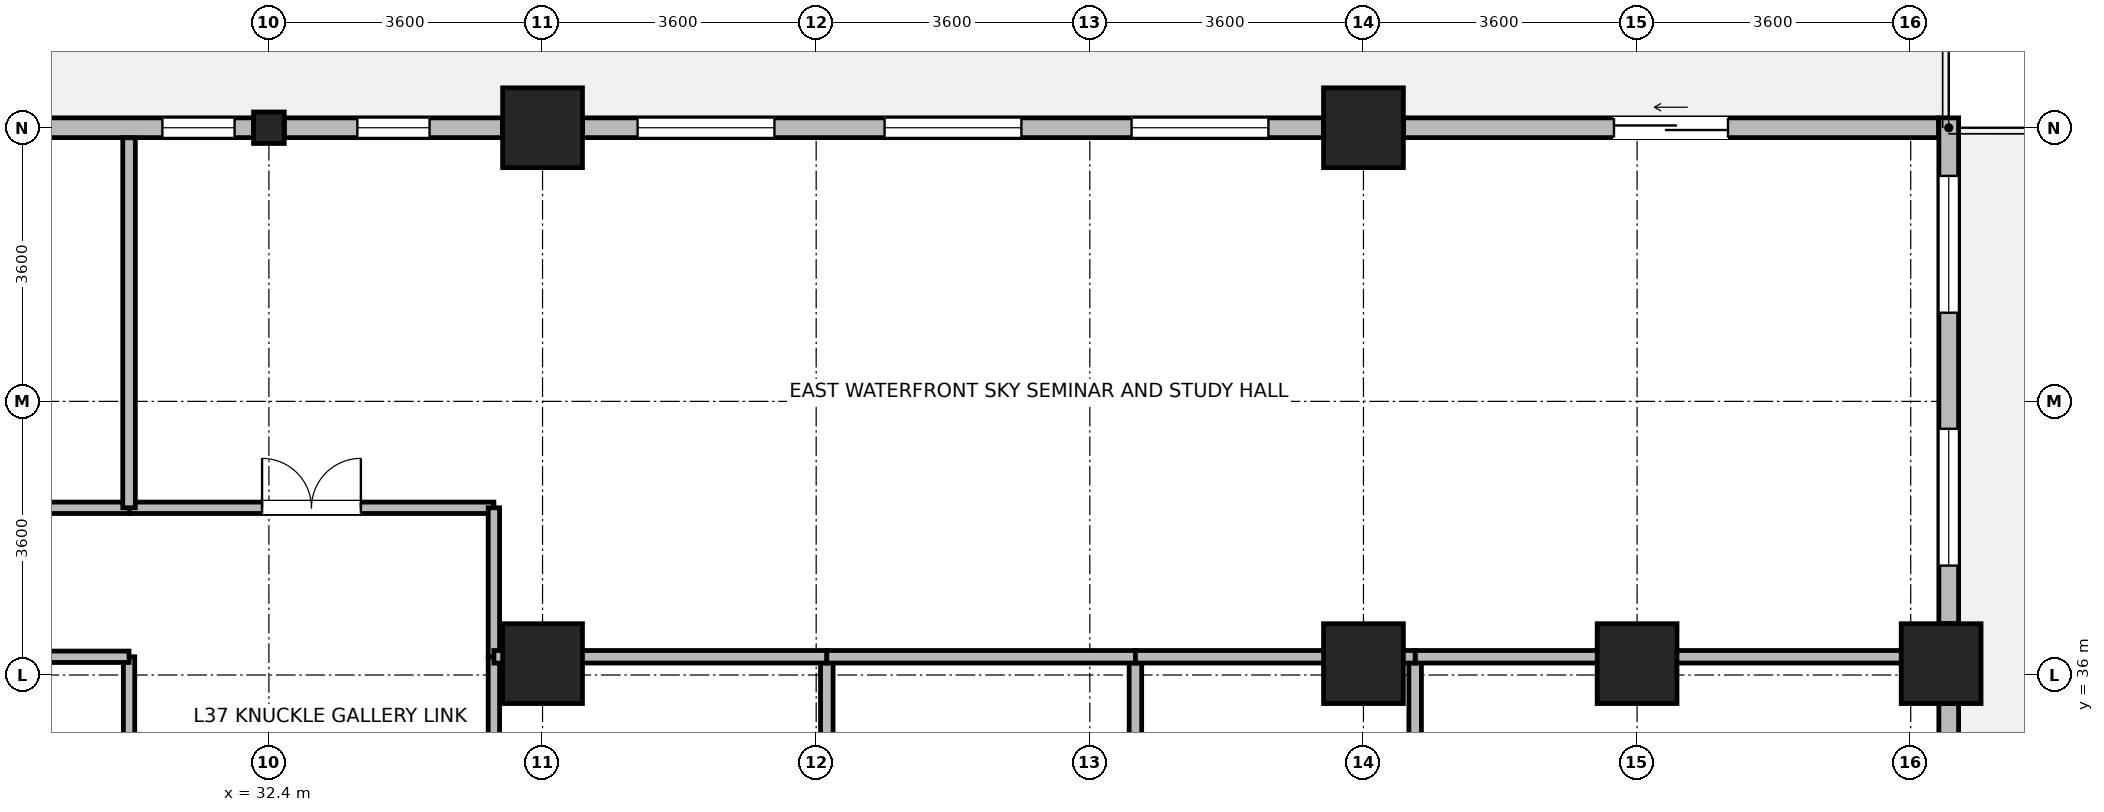
"""IFC4 building model, lengths in metres.
Left out: names, types, materials, properties, quantities, classifications, styles, units other than length and angle.
Written with IfcOpenShell. Run it as: python <this file> out.ifc"""

import sys

from ifc_helpers import new_model, si_unit, direction, frame, frame_2d, origin, origin_2d, place, context, subcontext, project, spatial, rectangle, i_section, extrude, source, transform, mapped, element, fill, save


model = new_model("IFC4")
c1 = context("Model", 3, precision=1e-05, world=origin(), true_north=direction((0.0, 1.0)))
c2 = subcontext(c1, "Body", "Model", "MODEL_VIEW")
j1 = project(units=[si_unit("LENGTHUNIT", "METRE"), si_unit("PLANEANGLEUNIT", "RADIAN")], contexts=[c1])
p1 = place(None, origin())
s1 = spatial("IfcSite", under=j1, at=p1, CompositionType="ELEMENT")
p2 = place(p1, origin())
s2 = spatial("IfcBuilding", under=s1, at=p2, CompositionType="ELEMENT")
p3 = place(p2, frame((0.0, 0.0, 147.6)))
s3 = spatial("IfcBuildingStorey", under=s2, at=p3, CompositionType="ELEMENT", Elevation=147.6)
m1 = source(origin(), c2, "Body", "SweptSolid", [
    extrude(rectangle(XDim=1.05, YDim=1.05, at=origin_2d()), origin(), (0.0, 0.0, 1.0), 3.7),
])
for number, where, z_axis, x_axis in (
    (1, (36.0, 43.2, 0.0), (0.0, 0.0, 1.0), (1.0, 0.0, 0.0)),
    (2, (36.0, 36.15, 0.0), (0.0, 0.0, 1.0), (1.0, 0.0, 0.0)),
    (3, (46.8, 36.15, 0.0), (0.0, 0.0, 1.0), (1.0, 0.0, 0.0)),
    (4, (46.8, 43.2, 0.0), (0.0, 0.0, 1.0), (1.0, 0.0, 0.0)),
    (5, (50.4, 36.15, 0.0), (0.0, 0.0, 1.0), (1.0, 0.0, 0.0)),
    (6, (54.4, 36.15, 0.0), (0.0, 0.0, 1.0), (1.0, 0.0, 0.0)),
):
    element("IfcColumn", number, at=place(p3, frame(where, z_axis=z_axis, x_axis=x_axis)), inside=s3, PredefinedType="COLUMN", context=c2, shape_type="MappedRepresentation", body=[
        mapped(m1, transform((0.0, 0.0, 0.0), x_axis=(1.0, 0.0, 0.0), y_axis=(0.0, 1.0, 0.0), z_axis=(0.0, 0.0, 1.0), scale=1.0)),
    ])
m2 = source(origin(), c2, "Body", "SweptSolid", [
    extrude(i_section(OverallWidth=0.404, OverallDepth=0.414, WebThickness=0.021, FlangeThickness=0.028, FilletRadius=0.015, at=origin_2d()), origin(), (0.0, 0.0, 1.0), 3.7),
])
p4 = place(p3, frame((32.4, 43.2, 0.0), z_axis=(0.0, 0.0, 1.0), x_axis=(1.0, 0.0, 0.0)))
e7 = element("IfcColumn", 7, at=p4, inside=s3, PredefinedType="COLUMN", context=c2, shape_type="MappedRepresentation", body=[
    mapped(m2, transform((0.0, 0.0, 0.0), x_axis=(1.0, 0.0, 0.0), y_axis=(0.0, 1.0, 0.0), z_axis=(0.0, 0.0, 1.0), scale=1.0)),
])
p5 = place(p3, frame((54.5, 35.624, 0.0), z_axis=(0.0, 0.0, 1.0), x_axis=(0.0, -1.0, 0.0)))
e8 = element("IfcWall", 8, at=p5, inside=s3, PredefinedType="STANDARD", context=c2, shape_type="SweptSolid", body=[
    extrude(rectangle(XDim=6.448, YDim=0.26, at=frame_2d((3.224, 0.0))), origin(), (0.0, 0.0, 1.0), 2.99),
])
p6 = place(p5, frame((0.712, 0.0, 0.85)))
e9 = element("IfcOpeningElement", 9, at=p6, cuts=e8, PredefinedType="OPENING", context=c2, shape_type="SweptSolid", body=[
    extrude(rectangle(XDim=1.8, YDim=1.85, at=frame_2d((0.9, 0.925))), frame((0.0, 0.14, 0.0), z_axis=(0.0, -1.0, 0.0), x_axis=(1.0, 0.0, 0.0)), (0.0, 0.0, 1.0), 0.28),
])
p7 = place(p5, frame((3.936, 0.0, 0.85)))
e10 = element("IfcOpeningElement", 10, at=p7, cuts=e8, PredefinedType="OPENING", context=c2, shape_type="SweptSolid", body=[
    extrude(rectangle(XDim=1.8, YDim=1.85, at=frame_2d((0.9, 0.925))), frame((0.0, 0.14, 0.0), z_axis=(0.0, -1.0, 0.0), x_axis=(1.0, 0.0, 0.0)), (0.0, 0.0, 1.0), 0.28),
])
p8 = place(p3, frame((54.5, 43.33, 0.0), z_axis=(0.0, 0.0, 1.0), x_axis=(0.0, -1.0, 0.0)))
e11 = element("IfcWall", 11, at=p8, inside=s3, PredefinedType="STANDARD", context=c2, shape_type="SweptSolid", body=[
    extrude(rectangle(XDim=6.654, YDim=0.26, at=frame_2d((3.327, 0.0))), origin(), (0.0, 0.0, 1.0), 3.44),
])
p9 = place(p8, frame((0.763, 0.0, 0.85)))
e12 = element("IfcOpeningElement", 12, at=p9, cuts=e11, PredefinedType="OPENING", context=c2, shape_type="SweptSolid", body=[
    extrude(rectangle(XDim=1.8, YDim=1.85, at=frame_2d((0.9, 0.925))), frame((0.0, 0.14, 0.0), z_axis=(0.0, -1.0, 0.0), x_axis=(1.0, 0.0, 0.0)), (0.0, 0.0, 1.0), 0.28),
])
p10 = place(p8, frame((4.091, 0.0, 0.85)))
e13 = element("IfcOpeningElement", 13, at=p10, cuts=e11, PredefinedType="OPENING", context=c2, shape_type="SweptSolid", body=[
    extrude(rectangle(XDim=1.8, YDim=1.85, at=frame_2d((0.9, 0.925))), frame((0.0, 0.14, 0.0), z_axis=(0.0, -1.0, 0.0), x_axis=(1.0, 0.0, 0.0)), (0.0, 0.0, 1.0), 0.28),
])
p11 = place(p3, frame((47.326, 43.2, 0.0), z_axis=(0.0, 0.0, 1.0), x_axis=(1.0, 0.0, 0.0)))
e14 = element("IfcWall", 14, at=p11, inside=s3, PredefinedType="STANDARD", context=c2, shape_type="SweptSolid", body=[
    extrude(rectangle(XDim=7.039, YDim=0.26, at=frame_2d((3.52, 0.0))), origin(), (0.0, 0.0, 1.0), 3.44),
])
p12 = place(p11, frame((2.77, 0.0, 0.0)))
e15 = element("IfcOpeningElement", 15, at=p12, cuts=e14, PredefinedType="OPENING", context=c2, shape_type="SweptSolid", body=[
    extrude(rectangle(XDim=1.5, YDim=2.15, at=frame_2d((0.75, 1.075))), frame((0.0, 0.14, 0.0), z_axis=(0.0, -1.0, 0.0), x_axis=(1.0, 0.0, 0.0)), (0.0, 0.0, 1.0), 0.28),
])
p13 = place(p3, frame((36.526, 43.2, 0.0), z_axis=(0.0, 0.0, 1.0), x_axis=(1.0, 0.0, 0.0)))
e16 = element("IfcWall", 16, at=p13, inside=s3, PredefinedType="STANDARD", context=c2, shape_type="SweptSolid", body=[
    extrude(rectangle(XDim=9.748, YDim=0.26, at=frame_2d((4.874, 0.0))), origin(), (0.0, 0.0, 1.0), 2.99),
])
p14 = place(p13, frame((0.725, 0.0, 0.85)))
e17 = element("IfcOpeningElement", 17, at=p14, cuts=e16, PredefinedType="OPENING", context=c2, shape_type="SweptSolid", body=[
    extrude(rectangle(XDim=1.8, YDim=1.85, at=frame_2d((0.9, 0.925))), frame((0.0, 0.14, 0.0), z_axis=(0.0, -1.0, 0.0), x_axis=(1.0, 0.0, 0.0)), (0.0, 0.0, 1.0), 0.28),
])
p15 = place(p13, frame((3.974, 0.0, 0.85)))
e18 = element("IfcOpeningElement", 18, at=p15, cuts=e16, PredefinedType="OPENING", context=c2, shape_type="SweptSolid", body=[
    extrude(rectangle(XDim=1.8, YDim=1.85, at=frame_2d((0.9, 0.925))), frame((0.0, 0.14, 0.0), z_axis=(0.0, -1.0, 0.0), x_axis=(1.0, 0.0, 0.0)), (0.0, 0.0, 1.0), 0.28),
])
p16 = place(p13, frame((7.223, 0.0, 0.85)))
e19 = element("IfcOpeningElement", 19, at=p16, cuts=e16, PredefinedType="OPENING", context=c2, shape_type="SweptSolid", body=[
    extrude(rectangle(XDim=1.8, YDim=1.85, at=frame_2d((0.9, 0.925))), frame((0.0, 0.14, 0.0), z_axis=(0.0, -1.0, 0.0), x_axis=(1.0, 0.0, 0.0)), (0.0, 0.0, 1.0), 0.28),
])
p17 = place(p3, frame((32.603, 43.2, 0.0), z_axis=(0.0, 0.0, 1.0), x_axis=(1.0, 0.0, 0.0)))
e20 = element("IfcWall", 20, at=p17, inside=s3, PredefinedType="STANDARD", context=c2, shape_type="SweptSolid", body=[
    extrude(rectangle(XDim=2.871, YDim=0.26, at=frame_2d((1.436, 0.0))), origin(), (0.0, 0.0, 1.0), 2.99),
])
p18 = place(p17, frame((0.96, 0.0, 0.85)))
e21 = element("IfcOpeningElement", 21, at=p18, cuts=e20, PredefinedType="OPENING", context=c2, shape_type="SweptSolid", body=[
    extrude(rectangle(XDim=0.95, YDim=1.75, at=frame_2d((0.475, 0.875))), frame((0.0, 0.14, 0.0), z_axis=(0.0, -1.0, 0.0), x_axis=(1.0, 0.0, 0.0)), (0.0, 0.0, 1.0), 0.28),
])
p19 = place(p3, frame((29.326, 43.2, 0.0), z_axis=(0.0, 0.0, 1.0), x_axis=(1.0, 0.0, 0.0)))
e22 = element("IfcWall", 22, at=p19, inside=s3, PredefinedType="STANDARD", context=c2, shape_type="SweptSolid", body=[
    extrude(rectangle(XDim=2.871, YDim=0.26, at=frame_2d((1.436, 0.0))), origin(), (0.0, 0.0, 1.0), 2.99),
])
p20 = place(p19, frame((1.673, 0.0, 0.85)))
e23 = element("IfcOpeningElement", 23, at=p20, cuts=e22, PredefinedType="OPENING", context=c2, shape_type="SweptSolid", body=[
    extrude(rectangle(XDim=0.95, YDim=1.75, at=frame_2d((0.475, 0.875))), frame((0.0, 0.14, 0.0), z_axis=(0.0, -1.0, 0.0), x_axis=(1.0, 0.0, 0.0)), (0.0, 0.0, 1.0), 0.28),
])
p21 = place(p3, frame((35.36, 28.56, 0.0), z_axis=(0.0, 0.0, 1.0), x_axis=(0.0, 1.0, 0.0)))
e24 = element("IfcWall", 24, at=p21, inside=s3, PredefinedType="PARTITIONING", context=c2, shape_type="SweptSolid", body=[
    extrude(rectangle(XDim=7.68, YDim=0.15, at=frame_2d((3.84, 0.0))), origin(), (0.0, 0.0, 1.0), 3.44),
])
p22 = place(p21, frame((3.19, 0.0, 0.0)))
e25 = element("IfcOpeningElement", 25, at=p22, cuts=e24, PredefinedType="OPENING", context=c2, shape_type="SweptSolid", body=[
    extrude(rectangle(XDim=1.3, YDim=2.12, at=frame_2d((0.65, 1.06))), frame((0.0, 0.085, 0.0), z_axis=(0.0, -1.0, 0.0), x_axis=(1.0, 0.0, 0.0)), (0.0, 0.0, 1.0), 0.17),
])
p23 = place(p3, frame((23.48, 38.2, 0.0), z_axis=(0.0, 0.0, 1.0), x_axis=(1.0, 0.0, 0.0)))
e26 = element("IfcWall", 26, at=p23, inside=s3, PredefinedType="PARTITIONING", context=c2, shape_type="SweptSolid", body=[
    extrude(rectangle(XDim=7.08, YDim=0.15, at=frame_2d((3.54, 0.0))), origin(), (0.0, 0.0, 1.0), 3.44),
])
p24 = place(p23, frame((2.89, 0.0, 0.0)))
e27 = element("IfcOpeningElement", 27, at=p24, cuts=e26, PredefinedType="OPENING", context=c2, shape_type="SweptSolid", body=[
    extrude(rectangle(XDim=1.3, YDim=2.12, at=frame_2d((0.65, 1.06))), frame((0.0, 0.085, 0.0), z_axis=(0.0, -1.0, 0.0), x_axis=(1.0, 0.0, 0.0)), (0.0, 0.0, 1.0), 0.17),
])
p25 = place(p3, frame((30.56, 38.2, 0.0), z_axis=(0.0, 0.0, 1.0), x_axis=(1.0, 0.0, 0.0)))
e28 = element("IfcWall", 28, at=p25, inside=s3, PredefinedType="PARTITIONING", context=c2, shape_type="SweptSolid", body=[
    extrude(rectangle(XDim=4.8, YDim=0.15, at=frame_2d((2.4, 0.0))), origin(), (0.0, 0.0, 1.0), 3.44),
])
p26 = place(p25, frame((1.75, 0.0, 0.0)))
e29 = element("IfcOpeningElement", 29, at=p26, cuts=e28, PredefinedType="OPENING", context=c2, shape_type="SweptSolid", body=[
    extrude(rectangle(XDim=1.3, YDim=2.12, at=frame_2d((0.65, 1.06))), frame((0.0, 0.085, 0.0), z_axis=(0.0, -1.0, 0.0), x_axis=(1.0, 0.0, 0.0)), (0.0, 0.0, 1.0), 0.17),
])
p27 = place(p3, frame((30.56, 32.4, 0.0), z_axis=(0.0, 0.0, 1.0), x_axis=(0.0, 1.0, 0.0)))
e30 = element("IfcWall", 30, at=p27, inside=s3, PredefinedType="PARTITIONING", context=c2, shape_type="SweptSolid", body=[
    extrude(rectangle(XDim=3.84, YDim=0.15, at=frame_2d((1.92, 0.0))), origin(), (0.0, 0.0, 1.0), 3.44),
])
p28 = place(p27, frame((1.27, 0.0, 0.0)))
e31 = element("IfcOpeningElement", 31, at=p28, cuts=e30, PredefinedType="OPENING", context=c2, shape_type="SweptSolid", body=[
    extrude(rectangle(XDim=1.3, YDim=2.12, at=frame_2d((0.65, 1.06))), frame((0.0, 0.085, 0.0), z_axis=(0.0, -1.0, 0.0), x_axis=(1.0, 0.0, 0.0)), (0.0, 0.0, 1.0), 0.17),
])
p29 = place(p3, frame((35.36, 36.24, 0.0), z_axis=(0.0, 0.0, 1.0), x_axis=(0.0, 1.0, 0.0)))
e32 = element("IfcWall", 32, at=p29, inside=s3, PredefinedType="PARTITIONING", context=c2, shape_type="SweptSolid", body=[
    extrude(rectangle(XDim=1.96, YDim=0.15, at=frame_2d((0.98, 0.0))), origin(), (0.0, 0.0, 1.0), 3.44),
])
p30 = place(p3, frame((29.325, 36.24, 0.0), z_axis=(0.0, 0.0, 1.0), x_axis=(1.0, 0.0, 0.0)))
e33 = element("IfcWall", 33, at=p30, inside=s3, PredefinedType="PARTITIONING", context=c2, shape_type="SweptSolid", body=[
    extrude(rectangle(XDim=1.235, YDim=0.15, at=frame_2d((0.618, 0.0))), origin(), (0.0, 0.0, 1.0), 2.84),
])
for number, where, z_axis, x_axis in (
    (34, (39.74, 28.56, 0.0), (0.0, 0.0, 1.0), (0.0, 1.0, 0.0)),
    (35, (43.8, 28.56, 0.0), (0.0, 0.0, 1.0), (0.0, 1.0, 0.0)),
    (36, (47.48, 28.56, 0.0), (0.0, 0.0, 1.0), (0.0, 1.0, 0.0)),
):
    element("IfcWall", number, at=place(p3, frame(where, z_axis=z_axis, x_axis=x_axis)), inside=s3, PredefinedType="PARTITIONING", context=c2, shape_type="SweptSolid", body=[
        extrude(rectangle(XDim=7.68, YDim=0.165, at=frame_2d((3.84, 0.0))), origin(), (0.0, 0.0, 1.0), 3.44),
    ])
p31 = place(p3, frame((47.48, 36.24, 0.0), z_axis=(0.0, 0.0, 1.0), x_axis=(1.0, 0.0, 0.0)))
e37 = element("IfcWall", 37, at=p31, inside=s3, PredefinedType="PARTITIONING", context=c2, shape_type="SweptSolid", body=[
    extrude(rectangle(XDim=6.888, YDim=0.165, at=frame_2d((3.444, 0.0))), origin(), (0.0, 0.0, 1.0), 2.84),
])
p32 = place(p3, frame((30.56, 38.2, 0.0), z_axis=(0.0, 0.0, 1.0), x_axis=(0.0, 1.0, 0.0)))
e38 = element("IfcWall", 38, at=p32, inside=s3, PredefinedType="PARTITIONING", context=c2, shape_type="SweptSolid", body=[
    extrude(rectangle(XDim=4.868, YDim=0.165, at=frame_2d((2.434, 0.0))), origin(), (0.0, 0.0, 1.0), 3.44),
])
p33 = place(p3, frame((35.36, 36.24, 0.0), z_axis=(0.0, 0.0, 1.0), x_axis=(1.0, 0.0, 0.0)))
e39 = element("IfcWall", 39, at=p33, inside=s3, PredefinedType="PARTITIONING", context=c2, shape_type="SweptSolid", body=[
    extrude(rectangle(XDim=4.38, YDim=0.165, at=frame_2d((2.19, 0.0))), origin(), (0.0, 0.0, 1.0), 2.84),
])
p34 = place(p3, frame((39.74, 36.24, 0.0), z_axis=(0.0, 0.0, 1.0), x_axis=(1.0, 0.0, 0.0)))
e40 = element("IfcWall", 40, at=p34, inside=s3, PredefinedType="PARTITIONING", context=c2, shape_type="SweptSolid", body=[
    extrude(rectangle(XDim=4.06, YDim=0.165, at=frame_2d((2.03, 0.0))), origin(), (0.0, 0.0, 1.0), 2.84),
])
p35 = place(p3, frame((43.8, 36.24, 0.0), z_axis=(0.0, 0.0, 1.0), x_axis=(1.0, 0.0, 0.0)))
e41 = element("IfcWall", 41, at=p35, inside=s3, PredefinedType="PARTITIONING", context=c2, shape_type="SweptSolid", body=[
    extrude(rectangle(XDim=3.68, YDim=0.165, at=frame_2d((1.84, 0.0))), origin(), (0.0, 0.0, 1.0), 2.84),
])
p36 = place(p9, origin())
e42 = element("IfcWindow", 42, at=p36, inside=s3, PartitioningType="SINGLE_PANEL", PredefinedType="WINDOW", context=c2, shape_type="SweptSolid", body=[
    extrude(rectangle(XDim=1.8, YDim=1.85, at=frame_2d((0.9, 0.925))), frame((0.0, 0.03, 0.0), z_axis=(0.0, -1.0, 0.0), x_axis=(1.0, 0.0, 0.0)), (0.0, 0.0, 1.0), 0.06),
])
fill(e12, e42)
p37 = place(p10, origin())
e43 = element("IfcWindow", 43, at=p37, inside=s3, PartitioningType="SINGLE_PANEL", PredefinedType="WINDOW", context=c2, shape_type="SweptSolid", body=[
    extrude(rectangle(XDim=1.8, YDim=1.85, at=frame_2d((0.9, 0.925))), frame((0.0, 0.03, 0.0), z_axis=(0.0, -1.0, 0.0), x_axis=(1.0, 0.0, 0.0)), (0.0, 0.0, 1.0), 0.06),
])
fill(e13, e43)
p38 = place(p12, origin())
e44 = element("IfcDoor", 44, at=p38, inside=s3, OperationType="SLIDING_TO_LEFT", PredefinedType="DOOR", context=c2, shape_type="SweptSolid", body=[
    extrude(rectangle(XDim=1.5, YDim=2.15, at=frame_2d((0.75, 1.075))), frame((0.0, 0.025, 0.0), z_axis=(0.0, -1.0, 0.0), x_axis=(1.0, 0.0, 0.0)), (0.0, 0.0, 1.0), 0.05),
])
fill(e15, e44)
p39 = place(p14, origin())
e45 = element("IfcWindow", 45, at=p39, inside=s3, PartitioningType="SINGLE_PANEL", PredefinedType="WINDOW", context=c2, shape_type="SweptSolid", body=[
    extrude(rectangle(XDim=1.8, YDim=1.85, at=frame_2d((0.9, 0.925))), frame((0.0, 0.03, 0.0), z_axis=(0.0, -1.0, 0.0), x_axis=(1.0, 0.0, 0.0)), (0.0, 0.0, 1.0), 0.06),
])
fill(e17, e45)
p40 = place(p15, origin())
e46 = element("IfcWindow", 46, at=p40, inside=s3, PartitioningType="SINGLE_PANEL", PredefinedType="WINDOW", context=c2, shape_type="SweptSolid", body=[
    extrude(rectangle(XDim=1.8, YDim=1.85, at=frame_2d((0.9, 0.925))), frame((0.0, 0.03, 0.0), z_axis=(0.0, -1.0, 0.0), x_axis=(1.0, 0.0, 0.0)), (0.0, 0.0, 1.0), 0.06),
])
fill(e18, e46)
p41 = place(p16, origin())
e47 = element("IfcWindow", 47, at=p41, inside=s3, PartitioningType="SINGLE_PANEL", PredefinedType="WINDOW", context=c2, shape_type="SweptSolid", body=[
    extrude(rectangle(XDim=1.8, YDim=1.85, at=frame_2d((0.9, 0.925))), frame((0.0, 0.03, 0.0), z_axis=(0.0, -1.0, 0.0), x_axis=(1.0, 0.0, 0.0)), (0.0, 0.0, 1.0), 0.06),
])
fill(e19, e47)
p42 = place(p18, origin())
e48 = element("IfcWindow", 48, at=p42, inside=s3, PartitioningType="SINGLE_PANEL", PredefinedType="WINDOW", context=c2, shape_type="SweptSolid", body=[
    extrude(rectangle(XDim=0.95, YDim=1.75, at=frame_2d((0.475, 0.875))), frame((0.0, 0.03, 0.0), z_axis=(0.0, -1.0, 0.0), x_axis=(1.0, 0.0, 0.0)), (0.0, 0.0, 1.0), 0.06),
])
fill(e21, e48)
p43 = place(p20, origin())
e49 = element("IfcWindow", 49, at=p43, inside=s3, PartitioningType="SINGLE_PANEL", PredefinedType="WINDOW", context=c2, shape_type="SweptSolid", body=[
    extrude(rectangle(XDim=0.95, YDim=1.75, at=frame_2d((0.475, 0.875))), frame((0.0, 0.03, 0.0), z_axis=(0.0, -1.0, 0.0), x_axis=(1.0, 0.0, 0.0)), (0.0, 0.0, 1.0), 0.06),
])
fill(e23, e49)
p44 = place(p26, origin())
e50 = element("IfcDoor", 50, at=p44, inside=s3, OperationType="DOUBLE_DOOR_SINGLE_SWING", PredefinedType="DOOR", context=c2, shape_type="SweptSolid", body=[
    extrude(rectangle(XDim=1.3, YDim=2.12, at=frame_2d((0.65, 1.06))), frame((0.0, 0.025, 0.0), z_axis=(0.0, -1.0, 0.0), x_axis=(1.0, 0.0, 0.0)), (0.0, 0.0, 1.0), 0.05),
])
fill(e29, e50)
save(model, sys.argv[1])
